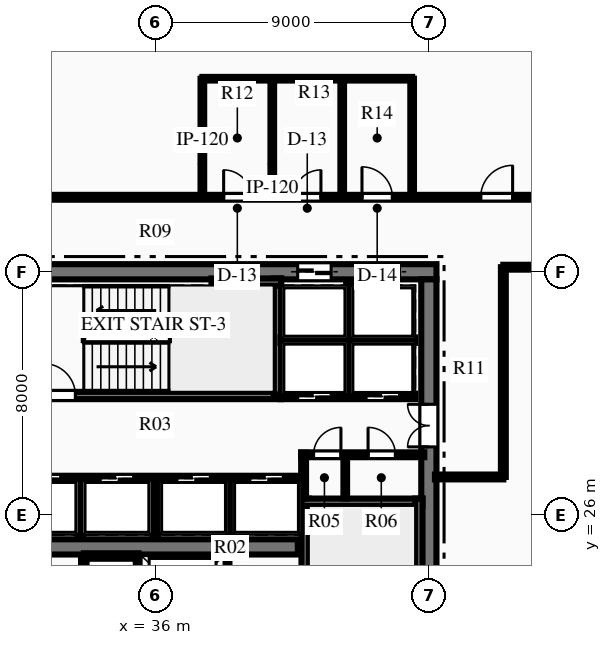
"""IFC4 building model, lengths in metres.
Left out: names, types, materials, properties, quantities, classifications, styles, units other than length and angle.
Written with IfcOpenShell. Run it as: python <this file> out.ifc"""

import sys

from ifc_helpers import new_model, si_unit, direction, frame, frame_2d, origin, place, context, subcontext, project, spatial, rectangle, extrude, element, fill, save


model = new_model("IFC4")
c1 = context("Model", 3, precision=1e-05, world=origin(), true_north=direction((0.0, 1.0)))
c2 = subcontext(c1, "Body", "Model", "MODEL_VIEW")
j1 = project(units=[si_unit("LENGTHUNIT", "METRE"), si_unit("PLANEANGLEUNIT", "RADIAN")], contexts=[c1])
p1 = place(None, origin())
s1 = spatial("IfcSite", under=j1, at=p1, CompositionType="ELEMENT")
p2 = place(p1, origin())
s2 = spatial("IfcBuilding", under=s1, at=p2, CompositionType="ELEMENT")
p3 = place(p2, frame((0.0, 0.0, 174.45)))
s3 = spatial("IfcBuildingStorey", under=s2, at=p3, CompositionType="ELEMENT", Elevation=174.45)
p4 = place(p3, frame((26.75, 34.0, 0.0), z_axis=(0.0, 0.0, 1.0), x_axis=(1.0, 0.0, 0.0)))
e1 = element("IfcWall", 1, at=p4, inside=s3, PredefinedType="SHEAR", context=c2, shape_type="SweptSolid", body=[
    extrude(rectangle(XDim=18.5, YDim=0.5, at=frame_2d((9.25, 0.0))), origin(), (0.0, 0.0, 1.0), 3.75),
])
p5 = place(p4, frame((13.935, 0.0, 0.0)))
e2 = element("IfcOpeningElement", 2, at=p5, cuts=e1, PredefinedType="OPENING", context=c2, shape_type="SweptSolid", body=[
    extrude(rectangle(XDim=1.1, YDim=2.15, at=frame_2d((0.55, 1.075))), frame((0.0, 0.26, 0.0), z_axis=(0.0, -1.0, 0.0), x_axis=(1.0, 0.0, 0.0)), (0.0, 0.0, 1.0), 0.52),
])
p6 = place(p4, frame((16.185, 0.0, 0.0)))
e3 = element("IfcOpeningElement", 3, at=p6, cuts=e1, PredefinedType="OPENING", context=c2, shape_type="SweptSolid", body=[
    extrude(rectangle(XDim=1.1, YDim=2.15, at=frame_2d((0.55, 1.075))), frame((0.0, 0.26, 0.0), z_axis=(0.0, -1.0, 0.0), x_axis=(1.0, 0.0, 0.0)), (0.0, 0.0, 1.0), 0.52),
])
p7 = place(p3, frame((45.0, 18.25, 0.0), z_axis=(0.0, 0.0, 1.0), x_axis=(0.0, 1.0, 0.0)))
e4 = element("IfcWall", 4, at=p7, inside=s3, PredefinedType="SHEAR", context=c2, shape_type="SweptSolid", body=[
    extrude(rectangle(XDim=15.5, YDim=0.5, at=frame_2d((7.75, 0.0))), origin(), (0.0, 0.0, 1.0), 3.75),
])
p8 = place(p7, frame((9.99, 0.0, 0.0)))
e5 = element("IfcOpeningElement", 5, at=p8, cuts=e4, PredefinedType="OPENING", context=c2, shape_type="SweptSolid", body=[
    extrude(rectangle(XDim=1.4, YDim=2.2, at=frame_2d((0.7, 1.1))), frame((0.0, 0.26, 0.0), z_axis=(0.0, -1.0, 0.0), x_axis=(1.0, 0.0, 0.0)), (0.0, 0.0, 1.0), 0.52),
])
p9 = place(p3, frame((31.31, 24.95, 0.0), z_axis=(0.0, 0.0, 1.0), x_axis=(1.0, 0.0, 0.0)))
e6 = element("IfcWall", 6, at=p9, inside=s3, PredefinedType="SHEAR", context=c2, shape_type="SweptSolid", body=[
    extrude(rectangle(XDim=9.38, YDim=0.5, at=frame_2d((4.69, 0.0))), origin(), (0.0, 0.0, 1.0), 3.75),
])
p10 = place(p3, frame((40.93, 18.28, 0.0), z_axis=(0.0, 0.0, 1.0), x_axis=(0.0, 1.0, 0.0)))
e7 = element("IfcWall", 7, at=p10, inside=s3, PredefinedType="SHEAR", context=c2, shape_type="SweptSolid", body=[
    extrude(rectangle(XDim=8.26, YDim=0.24, at=frame_2d((4.13, 0.0))), origin(), (0.0, 0.0, 1.0), 3.75),
])
p11 = place(p10, frame((0.365, 0.0, 0.0)))
e8 = element("IfcOpeningElement", 8, at=p11, cuts=e7, PredefinedType="OPENING", context=c2, shape_type="SweptSolid", body=[
    extrude(rectangle(XDim=1.05, YDim=2.15, at=frame_2d((0.525, 1.075))), frame((0.0, 0.13, 0.0), z_axis=(0.0, -1.0, 0.0), x_axis=(1.0, 0.0, 0.0)), (0.0, 0.0, 1.0), 0.26),
])
p12 = place(p3, frame((40.81, 26.42, 0.0), z_axis=(0.0, 0.0, 1.0), x_axis=(1.0, 0.0, 0.0)))
e9 = element("IfcWall", 9, at=p12, inside=s3, PredefinedType="SHEAR", context=c2, shape_type="SweptSolid", body=[
    extrude(rectangle(XDim=3.98, YDim=0.24, at=frame_2d((1.99, 0.0))), origin(), (0.0, 0.0, 1.0), 3.75),
])
p13 = place(p3, frame((44.67, 18.28, 0.0), z_axis=(0.0, 0.0, 1.0), x_axis=(0.0, 1.0, 0.0)))
e10 = element("IfcWall", 10, at=p13, inside=s3, PredefinedType="SHEAR", context=c2, shape_type="SweptSolid", body=[
    extrude(rectangle(XDim=8.26, YDim=0.24, at=frame_2d((4.13, 0.0))), origin(), (0.0, 0.0, 1.0), 3.75),
])
p14 = place(p3, frame((31.76, 29.93, 0.0), z_axis=(0.0, 0.0, 1.0), x_axis=(1.0, 0.0, 0.0)))
e11 = element("IfcWall", 11, at=p14, inside=s3, PredefinedType="SHEAR", context=c2, shape_type="SweptSolid", body=[
    extrude(rectangle(XDim=8.38, YDim=0.24, at=frame_2d((4.19, 0.0))), origin(), (0.0, 0.0, 1.0), 3.75),
])
p15 = place(p14, frame((0.565, 0.0, 0.0)))
e12 = element("IfcOpeningElement", 12, at=p15, cuts=e11, PredefinedType="OPENING", context=c2, shape_type="SweptSolid", body=[
    extrude(rectangle(XDim=1.05, YDim=2.15, at=frame_2d((0.525, 1.075))), frame((0.0, 0.13, 0.0), z_axis=(0.0, -1.0, 0.0), x_axis=(1.0, 0.0, 0.0)), (0.0, 0.0, 1.0), 0.26),
])
p16 = place(p3, frame((40.02, 29.93, 0.0), z_axis=(0.0, 0.0, 1.0), x_axis=(0.0, 1.0, 0.0)))
e13 = element("IfcWall", 13, at=p16, inside=s3, PredefinedType="SHEAR", context=c2, shape_type="SweptSolid", body=[
    extrude(rectangle(XDim=3.85, YDim=0.24, at=frame_2d((1.925, 0.0))), origin(), (0.0, 0.0, 1.0), 3.75),
])
p17 = place(p3, frame((37.85, 33.66, 0.0), z_axis=(0.0, 0.0, 1.0), x_axis=(1.0, 0.0, 0.0)))
e14 = element("IfcWall", 14, at=p17, inside=s3, PredefinedType="SHEAR", context=c2, shape_type="SweptSolid", body=[
    extrude(rectangle(XDim=2.29, YDim=0.24, at=frame_2d((1.145, 0.0))), origin(), (0.0, 0.0, 1.0), 3.75),
])
for number, where, z_axis, x_axis in (
    (15, (33.65, 22.05, 0.0), (0.0, 0.0, 1.0), (0.0, 1.0, 0.0)),
    (16, (35.45, 22.05, 0.0), (0.0, 0.0, 1.0), (0.0, 1.0, 0.0)),
):
    element("IfcWall", number, at=place(p3, frame(where, z_axis=z_axis, x_axis=x_axis)), inside=s3, PredefinedType="PARTITIONING", context=c2, shape_type="SweptSolid", body=[
        extrude(rectangle(XDim=2.6, YDim=0.18, at=frame_2d((1.3, 0.0))), origin(), (0.0, 0.0, 1.0), 3.46),
    ])
p18 = place(p3, frame((33.65, 24.65, 0.0), z_axis=(0.0, 0.0, 1.0), x_axis=(1.0, 0.0, 0.0)))
e17 = element("IfcWall", 17, at=p18, inside=s3, PredefinedType="PARTITIONING", context=c2, shape_type="SweptSolid", body=[
    extrude(rectangle(XDim=1.8, YDim=0.18, at=frame_2d((0.9, 0.0))), origin(), (0.0, 0.0, 1.0), 3.46),
])
p19 = place(p3, frame((38.35, 22.05, 0.0), z_axis=(0.0, 0.0, 1.0), x_axis=(0.0, 1.0, 0.0)))
e18 = element("IfcWall", 18, at=p19, inside=s3, PredefinedType="PARTITIONING", context=c2, shape_type="SweptSolid", body=[
    extrude(rectangle(XDim=2.6, YDim=0.18, at=frame_2d((1.3, 0.0))), origin(), (0.0, 0.0, 1.0), 3.46),
])
p20 = place(p3, frame((40.8, 27.98, 0.0), z_axis=(0.0, 0.0, 1.0), x_axis=(1.0, 0.0, 0.0)))
e19 = element("IfcWall", 19, at=p20, inside=s3, PredefinedType="PARTITIONING", context=c2, shape_type="SweptSolid", body=[
    extrude(rectangle(XDim=4.05, YDim=0.16, at=frame_2d((2.025, 0.0))), origin(), (0.0, 0.0, 1.0), 3.46),
])
p21 = place(p20, frame((0.407, 0.0, 0.0)))
e20 = element("IfcOpeningElement", 20, at=p21, cuts=e19, PredefinedType="OPENING", context=c2, shape_type="SweptSolid", body=[
    extrude(rectangle(XDim=0.9, YDim=2.15, at=frame_2d((0.45, 1.075))), frame((0.0, 0.09, 0.0), z_axis=(0.0, -1.0, 0.0), x_axis=(1.0, 0.0, 0.0)), (0.0, 0.0, 1.0), 0.18),
])
p22 = place(p20, frame((2.2, 0.0, 0.0)))
e21 = element("IfcOpeningElement", 21, at=p22, cuts=e19, PredefinedType="OPENING", context=c2, shape_type="SweptSolid", body=[
    extrude(rectangle(XDim=0.9, YDim=2.15, at=frame_2d((0.45, 1.075))), frame((0.0, 0.09, 0.0), z_axis=(0.0, -1.0, 0.0), x_axis=(1.0, 0.0, 0.0)), (0.0, 0.0, 1.0), 0.18),
])
p23 = place(p3, frame((40.88, 26.54, 0.0), z_axis=(0.0, 0.0, 1.0), x_axis=(0.0, 1.0, 0.0)))
e22 = element("IfcWall", 22, at=p23, inside=s3, PredefinedType="PARTITIONING", context=c2, shape_type="SweptSolid", body=[
    extrude(rectangle(XDim=1.51, YDim=0.16, at=frame_2d((0.755, 0.0))), origin(), (0.0, 0.0, 1.0), 3.46),
])
p24 = place(p3, frame((42.25, 26.54, 0.0), z_axis=(0.0, 0.0, 1.0), x_axis=(0.0, 1.0, 0.0)))
e23 = element("IfcWall", 23, at=p24, inside=s3, PredefinedType="PARTITIONING", context=c2, shape_type="SweptSolid", body=[
    extrude(rectangle(XDim=1.44, YDim=0.12, at=frame_2d((0.72, 0.0))), origin(), (0.0, 0.0, 1.0), 3.46),
])
p25 = place(p3, frame((40.12, 29.9, 0.0), z_axis=(0.0, 0.0, 1.0), x_axis=(1.0, 0.0, 0.0)))
e24 = element("IfcWall", 24, at=p25, inside=s3, PredefinedType="PARTITIONING", context=c2, shape_type="SweptSolid", body=[
    extrude(rectangle(XDim=4.43, YDim=0.18, at=frame_2d((2.215, 0.0))), origin(), (0.0, 0.0, 1.0), 3.46),
])
p26 = place(p25, frame((0.565, 0.0, 0.0)))
e25 = element("IfcOpeningElement", 25, at=p26, cuts=e24, PredefinedType="OPENING", context=c2, shape_type="SweptSolid", body=[
    extrude(rectangle(XDim=1.1, YDim=2.15, at=frame_2d((0.55, 1.075))), frame((0.0, 0.1, 0.0), z_axis=(0.0, -1.0, 0.0), x_axis=(1.0, 0.0, 0.0)), (0.0, 0.0, 1.0), 0.2),
])
p27 = place(p25, frame((2.815, 0.0, 0.0)))
e26 = element("IfcOpeningElement", 26, at=p27, cuts=e24, PredefinedType="OPENING", context=c2, shape_type="SweptSolid", body=[
    extrude(rectangle(XDim=1.1, YDim=2.15, at=frame_2d((0.55, 1.075))), frame((0.0, 0.1, 0.0), z_axis=(0.0, -1.0, 0.0), x_axis=(1.0, 0.0, 0.0)), (0.0, 0.0, 1.0), 0.2),
])
p28 = place(p3, frame((40.12, 31.75, 0.0), z_axis=(0.0, 0.0, 1.0), x_axis=(1.0, 0.0, 0.0)))
e27 = element("IfcWall", 27, at=p28, inside=s3, PredefinedType="PARTITIONING", context=c2, shape_type="SweptSolid", body=[
    extrude(rectangle(XDim=4.43, YDim=0.18, at=frame_2d((2.215, 0.0))), origin(), (0.0, 0.0, 1.0), 3.46),
])
p29 = place(p3, frame((42.37, 29.9, 0.0), z_axis=(0.0, 0.0, 1.0), x_axis=(0.0, 1.0, 0.0)))
e28 = element("IfcWall", 28, at=p29, inside=s3, PredefinedType="PARTITIONING", context=c2, shape_type="SweptSolid", body=[
    extrude(rectangle(XDim=3.75, YDim=0.18, at=frame_2d((1.875, 0.0))), origin(), (0.0, 0.0, 1.0), 3.46),
])
p30 = place(p3, frame((31.2, 27.2, 0.0), z_axis=(0.0, 0.0, 1.0), x_axis=(1.0, 0.0, 0.0)))
e29 = element("IfcWall", 29, at=p30, inside=s3, PredefinedType="PARTITIONING", context=c2, shape_type="SweptSolid", body=[
    extrude(rectangle(XDim=9.6, YDim=0.18, at=frame_2d((4.8, 0.0))), origin(), (0.0, 0.0, 1.0), 3.46),
])
p31 = place(p30, frame((0.59, 0.0, 0.0)))
e30 = element("IfcOpeningElement", 30, at=p31, cuts=e29, PredefinedType="OPENING", context=c2, shape_type="SweptSolid", body=[
    extrude(rectangle(XDim=1.1, YDim=2.15, at=frame_2d((0.55, 1.075))), frame((0.0, 0.1, 0.0), z_axis=(0.0, -1.0, 0.0), x_axis=(1.0, 0.0, 0.0)), (0.0, 0.0, 1.0), 0.2),
])
p32 = place(p30, frame((2.99, 0.0, 0.0)))
e31 = element("IfcOpeningElement", 31, at=p32, cuts=e29, PredefinedType="OPENING", context=c2, shape_type="SweptSolid", body=[
    extrude(rectangle(XDim=1.1, YDim=2.15, at=frame_2d((0.55, 1.075))), frame((0.0, 0.1, 0.0), z_axis=(0.0, -1.0, 0.0), x_axis=(1.0, 0.0, 0.0)), (0.0, 0.0, 1.0), 0.2),
])
p33 = place(p30, frame((5.51, 0.0, 0.0)))
e32 = element("IfcOpeningElement", 32, at=p33, cuts=e29, PredefinedType="OPENING", context=c2, shape_type="SweptSolid", body=[
    extrude(rectangle(XDim=1.1, YDim=2.15, at=frame_2d((0.55, 1.075))), frame((0.0, 0.1, 0.0), z_axis=(0.0, -1.0, 0.0), x_axis=(1.0, 0.0, 0.0)), (0.0, 0.0, 1.0), 0.2),
])
p34 = place(p30, frame((7.91, 0.0, 0.0)))
e33 = element("IfcOpeningElement", 33, at=p34, cuts=e29, PredefinedType="OPENING", context=c2, shape_type="SweptSolid", body=[
    extrude(rectangle(XDim=1.1, YDim=2.15, at=frame_2d((0.55, 1.075))), frame((0.0, 0.1, 0.0), z_axis=(0.0, -1.0, 0.0), x_axis=(1.0, 0.0, 0.0)), (0.0, 0.0, 1.0), 0.2),
])
for number, where, z_axis, x_axis in (
    (34, (33.54, 25.3, 0.0), (0.0, 0.0, 1.0), (0.0, 1.0, 0.0)),
    (35, (36.0, 25.3, 0.0), (0.0, 0.0, 1.0), (0.0, 1.0, 0.0)),
    (36, (38.46, 25.3, 0.0), (0.0, 0.0, 1.0), (0.0, 1.0, 0.0)),
):
    element("IfcWall", number, at=place(p3, frame(where, z_axis=z_axis, x_axis=x_axis)), inside=s3, PredefinedType="PARTITIONING", context=c2, shape_type="SweptSolid", body=[
        extrude(rectangle(XDim=1.9, YDim=0.18, at=frame_2d((0.95, 0.0))), origin(), (0.0, 0.0, 1.0), 3.46),
    ])
p35 = place(p3, frame((18.2, 36.45, 0.0), z_axis=(0.0, 0.0, 1.0), x_axis=(1.0, 0.0, 0.0)))
e37 = element("IfcWall", 37, at=p35, inside=s3, PredefinedType="PARTITIONING", context=c2, shape_type="SweptSolid", body=[
    extrude(rectangle(XDim=35.6, YDim=0.16, at=frame_2d((17.8, 0.0))), origin(), (0.0, 0.0, 1.0), 3.46),
])
p36 = place(p35, frame((20.05, 0.0, 0.0)))
e38 = element("IfcOpeningElement", 38, at=p36, cuts=e37, PredefinedType="OPENING", context=c2, shape_type="SweptSolid", body=[
    extrude(rectangle(XDim=0.9, YDim=2.15, at=frame_2d((0.45, 1.075))), frame((0.0, 0.09, 0.0), z_axis=(0.0, -1.0, 0.0), x_axis=(1.0, 0.0, 0.0)), (0.0, 0.0, 1.0), 0.18),
])
p37 = place(p35, frame((22.35, 0.0, 0.0)))
e39 = element("IfcOpeningElement", 39, at=p37, cuts=e37, PredefinedType="OPENING", context=c2, shape_type="SweptSolid", body=[
    extrude(rectangle(XDim=0.9, YDim=2.15, at=frame_2d((0.45, 1.075))), frame((0.0, 0.09, 0.0), z_axis=(0.0, -1.0, 0.0), x_axis=(1.0, 0.0, 0.0)), (0.0, 0.0, 1.0), 0.18),
])
p38 = place(p35, frame((24.6, 0.0, 0.0)))
e40 = element("IfcOpeningElement", 40, at=p38, cuts=e37, PredefinedType="OPENING", context=c2, shape_type="SweptSolid", body=[
    extrude(rectangle(XDim=1.0, YDim=2.15, at=frame_2d((0.5, 1.075))), frame((0.0, 0.09, 0.0), z_axis=(0.0, -1.0, 0.0), x_axis=(1.0, 0.0, 0.0)), (0.0, 0.0, 1.0), 0.18),
])
p39 = place(p35, frame((1.757, 0.0, 0.0)))
e41 = element("IfcOpeningElement", 41, at=p39, cuts=e37, PredefinedType="OPENING", context=c2, shape_type="SweptSolid", body=[
    extrude(rectangle(XDim=1.05, YDim=2.15, at=frame_2d((0.525, 1.075))), frame((0.0, 0.09, 0.0), z_axis=(0.0, -1.0, 0.0), x_axis=(1.0, 0.0, 0.0)), (0.0, 0.0, 1.0), 0.18),
])
p40 = place(p35, frame((11.155, 0.0, 0.0)))
e42 = element("IfcOpeningElement", 42, at=p40, cuts=e37, PredefinedType="OPENING", context=c2, shape_type="SweptSolid", body=[
    extrude(rectangle(XDim=1.05, YDim=2.15, at=frame_2d((0.525, 1.075))), frame((0.0, 0.09, 0.0), z_axis=(0.0, -1.0, 0.0), x_axis=(1.0, 0.0, 0.0)), (0.0, 0.0, 1.0), 0.18),
])
p41 = place(p35, frame((28.505, 0.0, 0.0)))
e43 = element("IfcOpeningElement", 43, at=p41, cuts=e37, PredefinedType="OPENING", context=c2, shape_type="SweptSolid", body=[
    extrude(rectangle(XDim=1.05, YDim=2.15, at=frame_2d((0.525, 1.075))), frame((0.0, 0.09, 0.0), z_axis=(0.0, -1.0, 0.0), x_axis=(1.0, 0.0, 0.0)), (0.0, 0.0, 1.0), 0.18),
])
p42 = place(p3, frame((47.45, 34.15, 0.0), z_axis=(0.0, 0.0, 1.0), x_axis=(1.0, 0.0, 0.0)))
e44 = element("IfcWall", 44, at=p42, inside=s3, PredefinedType="PARTITIONING", context=c2, shape_type="SweptSolid", body=[
    extrude(rectangle(XDim=6.35, YDim=0.16, at=frame_2d((3.175, 0.0))), origin(), (0.0, 0.0, 1.0), 3.46),
])
p43 = place(p3, frame((47.45, 27.25, 0.0), z_axis=(0.0, 0.0, 1.0), x_axis=(0.0, 1.0, 0.0)))
e45 = element("IfcWall", 45, at=p43, inside=s3, PredefinedType="PARTITIONING", context=c2, shape_type="SweptSolid", body=[
    extrude(rectangle(XDim=6.9, YDim=0.16, at=frame_2d((3.45, 0.0))), origin(), (0.0, 0.0, 1.0), 3.46),
])
p44 = place(p3, frame((45.2, 27.25, 0.0), z_axis=(0.0, 0.0, 1.0), x_axis=(1.0, 0.0, 0.0)))
e46 = element("IfcWall", 46, at=p44, inside=s3, PredefinedType="PARTITIONING", context=c2, shape_type="SweptSolid", body=[
    extrude(rectangle(XDim=2.25, YDim=0.16, at=frame_2d((1.125, 0.0))), origin(), (0.0, 0.0, 1.0), 3.46),
])
for number, where, z_axis, x_axis in (
    (47, (37.55, 36.45, 0.0), (0.0, 0.0, 1.0), (0.0, 1.0, 0.0)),
    (48, (39.85, 36.45, 0.0), (0.0, 0.0, 1.0), (0.0, 1.0, 0.0)),
    (49, (42.15, 36.45, 0.0), (0.0, 0.0, 1.0), (0.0, 1.0, 0.0)),
    (50, (44.45, 36.45, 0.0), (0.0, 0.0, 1.0), (0.0, 1.0, 0.0)),
):
    element("IfcWall", number, at=place(p3, frame(where, z_axis=z_axis, x_axis=x_axis)), inside=s3, PredefinedType="PARTITIONING", context=c2, shape_type="SweptSolid", body=[
        extrude(rectangle(XDim=3.9, YDim=0.12, at=frame_2d((1.95, 0.0))), origin(), (0.0, 0.0, 1.0), 3.46),
    ])
p45 = place(p3, frame((37.55, 40.35, 0.0), z_axis=(0.0, 0.0, 1.0), x_axis=(1.0, 0.0, 0.0)))
e51 = element("IfcWall", 51, at=p45, inside=s3, PredefinedType="PARTITIONING", context=c2, shape_type="SweptSolid", body=[
    extrude(rectangle(XDim=6.9, YDim=0.12, at=frame_2d((3.45, 0.0))), origin(), (0.0, 0.0, 1.0), 3.46),
])
p46 = place(p21, origin())
e52 = element("IfcDoor", 52, at=p46, inside=s3, OperationType="SINGLE_SWING_RIGHT", PredefinedType="DOOR", context=c2, shape_type="SweptSolid", body=[
    extrude(rectangle(XDim=0.9, YDim=2.15, at=frame_2d((0.45, 1.075))), frame((0.0, 0.025, 0.0), z_axis=(0.0, -1.0, 0.0), x_axis=(1.0, 0.0, 0.0)), (0.0, 0.0, 1.0), 0.05),
])
fill(e20, e52)
p47 = place(p22, origin())
e53 = element("IfcDoor", 53, at=p47, inside=s3, OperationType="SINGLE_SWING_LEFT", PredefinedType="DOOR", context=c2, shape_type="SweptSolid", body=[
    extrude(rectangle(XDim=0.9, YDim=2.15, at=frame_2d((0.45, 1.075))), frame((0.0, 0.025, 0.0), z_axis=(0.0, -1.0, 0.0), x_axis=(1.0, 0.0, 0.0)), (0.0, 0.0, 1.0), 0.05),
])
fill(e21, e53)
p48 = place(p15, origin())
e54 = element("IfcDoor", 54, at=p48, inside=s3, OperationType="SINGLE_SWING_LEFT", PredefinedType="DOOR", context=c2, shape_type="SweptSolid", body=[
    extrude(rectangle(XDim=1.05, YDim=2.15, at=frame_2d((0.525, 1.075))), frame((0.0, 0.025, 0.0), z_axis=(0.0, -1.0, 0.0), x_axis=(1.0, 0.0, 0.0)), (0.0, 0.0, 1.0), 0.05),
])
fill(e12, e54)
p49 = place(p8, origin())
e55 = element("IfcDoor", 55, at=p49, inside=s3, OperationType="DOUBLE_DOOR_SINGLE_SWING", PredefinedType="DOOR", context=c2, shape_type="SweptSolid", body=[
    extrude(rectangle(XDim=1.4, YDim=2.2, at=frame_2d((0.7, 1.1))), frame((0.0, 0.025, 0.0), z_axis=(0.0, -1.0, 0.0), x_axis=(1.0, 0.0, 0.0)), (0.0, 0.0, 1.0), 0.05),
])
fill(e5, e55)
p50 = place(p36, origin())
e56 = element("IfcDoor", 56, at=p50, inside=s3, OperationType="SINGLE_SWING_LEFT", PredefinedType="DOOR", context=c2, shape_type="SweptSolid", body=[
    extrude(rectangle(XDim=0.9, YDim=2.15, at=frame_2d((0.45, 1.075))), frame((0.0, 0.025, 0.0), z_axis=(0.0, -1.0, 0.0), x_axis=(1.0, 0.0, 0.0)), (0.0, 0.0, 1.0), 0.05),
])
fill(e38, e56)
p51 = place(p37, origin())
e57 = element("IfcDoor", 57, at=p51, inside=s3, OperationType="SINGLE_SWING_RIGHT", PredefinedType="DOOR", context=c2, shape_type="SweptSolid", body=[
    extrude(rectangle(XDim=0.9, YDim=2.15, at=frame_2d((0.45, 1.075))), frame((0.0, 0.025, 0.0), z_axis=(0.0, -1.0, 0.0), x_axis=(1.0, 0.0, 0.0)), (0.0, 0.0, 1.0), 0.05),
])
fill(e39, e57)
p52 = place(p38, origin())
e58 = element("IfcDoor", 58, at=p52, inside=s3, OperationType="SINGLE_SWING_LEFT", PredefinedType="DOOR", context=c2, shape_type="SweptSolid", body=[
    extrude(rectangle(XDim=1.0, YDim=2.15, at=frame_2d((0.5, 1.075))), frame((0.0, 0.025, 0.0), z_axis=(0.0, -1.0, 0.0), x_axis=(1.0, 0.0, 0.0)), (0.0, 0.0, 1.0), 0.05),
])
fill(e40, e58)
p53 = place(p41, origin())
e59 = element("IfcDoor", 59, at=p53, inside=s3, OperationType="SINGLE_SWING_RIGHT", PredefinedType="DOOR", context=c2, shape_type="SweptSolid", body=[
    extrude(rectangle(XDim=1.05, YDim=2.15, at=frame_2d((0.525, 1.075))), frame((0.0, 0.025, 0.0), z_axis=(0.0, -1.0, 0.0), x_axis=(1.0, 0.0, 0.0)), (0.0, 0.0, 1.0), 0.05),
])
fill(e43, e59)
p54 = place(p26, origin())
e60 = element("IfcDoor", 60, at=p54, inside=s3, OperationType="SLIDING_TO_LEFT", PredefinedType="DOOR", context=c2, shape_type="SweptSolid", body=[
    extrude(rectangle(XDim=1.1, YDim=2.15, at=frame_2d((0.55, 1.075))), frame((0.0, 0.025, 0.0), z_axis=(0.0, -1.0, 0.0), x_axis=(1.0, 0.0, 0.0)), (0.0, 0.0, 1.0), 0.05),
])
fill(e25, e60)
p55 = place(p27, origin())
e61 = element("IfcDoor", 61, at=p55, inside=s3, OperationType="SLIDING_TO_LEFT", PredefinedType="DOOR", context=c2, shape_type="SweptSolid", body=[
    extrude(rectangle(XDim=1.1, YDim=2.15, at=frame_2d((0.55, 1.075))), frame((0.0, 0.025, 0.0), z_axis=(0.0, -1.0, 0.0), x_axis=(1.0, 0.0, 0.0)), (0.0, 0.0, 1.0), 0.05),
])
fill(e26, e61)
p56 = place(p5, origin())
e62 = element("IfcDoor", 62, at=p56, inside=s3, OperationType="SLIDING_TO_LEFT", PredefinedType="DOOR", context=c2, shape_type="SweptSolid", body=[
    extrude(rectangle(XDim=1.1, YDim=2.15, at=frame_2d((0.55, 1.075))), frame((0.0, 0.025, 0.0), z_axis=(0.0, -1.0, 0.0), x_axis=(1.0, 0.0, 0.0)), (0.0, 0.0, 1.0), 0.05),
])
fill(e2, e62)
p57 = place(p6, origin())
e63 = element("IfcDoor", 63, at=p57, inside=s3, OperationType="SLIDING_TO_LEFT", PredefinedType="DOOR", context=c2, shape_type="SweptSolid", body=[
    extrude(rectangle(XDim=1.1, YDim=2.15, at=frame_2d((0.55, 1.075))), frame((0.0, 0.025, 0.0), z_axis=(0.0, -1.0, 0.0), x_axis=(1.0, 0.0, 0.0)), (0.0, 0.0, 1.0), 0.05),
])
fill(e3, e63)
p58 = place(p31, origin())
e64 = element("IfcDoor", 64, at=p58, inside=s3, OperationType="SLIDING_TO_LEFT", PredefinedType="DOOR", context=c2, shape_type="SweptSolid", body=[
    extrude(rectangle(XDim=1.1, YDim=2.15, at=frame_2d((0.55, 1.075))), frame((0.0, 0.025, 0.0), z_axis=(0.0, -1.0, 0.0), x_axis=(1.0, 0.0, 0.0)), (0.0, 0.0, 1.0), 0.05),
])
fill(e30, e64)
p59 = place(p32, origin())
e65 = element("IfcDoor", 65, at=p59, inside=s3, OperationType="SLIDING_TO_LEFT", PredefinedType="DOOR", context=c2, shape_type="SweptSolid", body=[
    extrude(rectangle(XDim=1.1, YDim=2.15, at=frame_2d((0.55, 1.075))), frame((0.0, 0.025, 0.0), z_axis=(0.0, -1.0, 0.0), x_axis=(1.0, 0.0, 0.0)), (0.0, 0.0, 1.0), 0.05),
])
fill(e31, e65)
p60 = place(p33, origin())
e66 = element("IfcDoor", 66, at=p60, inside=s3, OperationType="SLIDING_TO_LEFT", PredefinedType="DOOR", context=c2, shape_type="SweptSolid", body=[
    extrude(rectangle(XDim=1.1, YDim=2.15, at=frame_2d((0.55, 1.075))), frame((0.0, 0.025, 0.0), z_axis=(0.0, -1.0, 0.0), x_axis=(1.0, 0.0, 0.0)), (0.0, 0.0, 1.0), 0.05),
])
fill(e32, e66)
p61 = place(p34, origin())
e67 = element("IfcDoor", 67, at=p61, inside=s3, OperationType="SLIDING_TO_LEFT", PredefinedType="DOOR", context=c2, shape_type="SweptSolid", body=[
    extrude(rectangle(XDim=1.1, YDim=2.15, at=frame_2d((0.55, 1.075))), frame((0.0, 0.025, 0.0), z_axis=(0.0, -1.0, 0.0), x_axis=(1.0, 0.0, 0.0)), (0.0, 0.0, 1.0), 0.05),
])
fill(e33, e67)
save(model, sys.argv[1])
